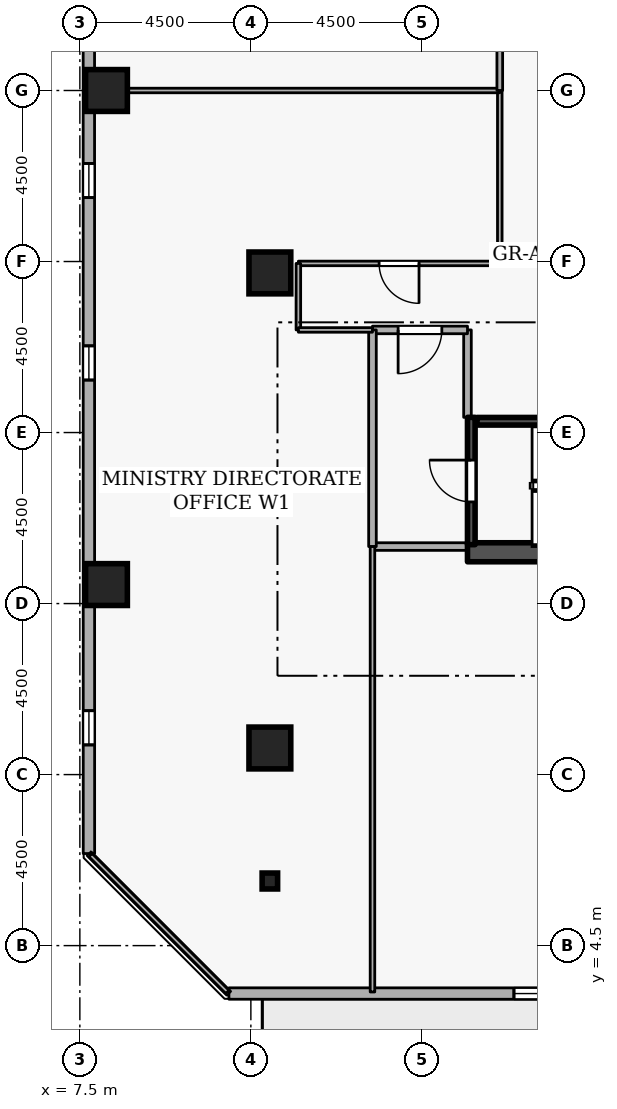
"""IFC4 building model, lengths in metres.
Left out: names, types, materials, properties, quantities, classifications, styles, units other than length and angle.
Written with IfcOpenShell. Run it as: python <this file> out.ifc"""

import sys

from ifc_helpers import new_model, si_unit, direction, frame, frame_2d, origin, origin_2d, place, context, subcontext, project, spatial, rectangle, i_section, extrude, element, fill, save


model = new_model("IFC4")
c1 = context("Model", 3, precision=1e-05, world=origin(), true_north=direction((0.0, 1.0)))
c2 = subcontext(c1, "Body", "Model", "MODEL_VIEW")
j1 = project(units=[si_unit("LENGTHUNIT", "METRE"), si_unit("PLANEANGLEUNIT", "RADIAN")], contexts=[c1])
p1 = place(None, origin())
s1 = spatial("IfcSite", under=j1, at=p1, CompositionType="ELEMENT")
p2 = place(p1, origin())
s2 = spatial("IfcBuilding", under=s1, at=p2, CompositionType="ELEMENT")
p3 = place(p2, frame((0.0, 0.0, 156.3)))
s3 = spatial("IfcBuildingStorey", under=s2, at=p3, CompositionType="ELEMENT", Elevation=156.3)
p4 = place(p3, frame((17.7, 14.85, 0.0), z_axis=(0.0, 0.0, 1.0), x_axis=(1.0, 0.0, 0.0)))
e1 = element("IfcWall", 1, at=p4, inside=s3, PredefinedType="SHEAR", context=c2, shape_type="SweptSolid", body=[
    extrude(rectangle(XDim=15.6, YDim=0.5, at=frame_2d((7.8, 0.0))), origin(), (0.0, 0.0, 1.0), 3.6),
])
for number, where, z_axis, x_axis in (
    (2, (12.5, 9.7, 0.0), (0.0, 0.0, 1.0), (1.0, 0.0, 0.0)),
    (3, (8.2, 14.0, 0.0), (0.0, 0.0, 1.0), (1.0, 0.0, 0.0)),
    (4, (8.2, 27.0, 0.0), (0.0, 0.0, 1.0), (1.0, 0.0, 0.0)),
    (5, (12.5, 22.2, 0.0), (0.0, 0.0, 1.0), (1.0, 0.0, 0.0)),
):
    element("IfcColumn", number, at=place(p3, frame(where, z_axis=z_axis, x_axis=x_axis)), inside=s3, PredefinedType="COLUMN", context=c2, shape_type="SweptSolid", body=[
        extrude(rectangle(XDim=1.1, YDim=1.1, at=origin_2d()), origin(), (0.0, 0.0, 1.0), 3.6),
    ])
p5 = place(p3, frame((12.5, 6.2, 0.0), z_axis=(0.0, 0.0, 1.0), x_axis=(1.0, 0.0, 0.0)))
e6 = element("IfcColumn", 6, at=p5, inside=s3, PredefinedType="COLUMN", context=c2, shape_type="SweptSolid", body=[
    extrude(i_section(OverallWidth=0.407, OverallDepth=0.419, WebThickness=0.031, FlangeThickness=0.049, FilletRadius=0.015, at=origin_2d()), origin(), (0.0, 0.0, 1.0), 3.6),
])
p6 = place(p3, frame((11.422, 3.239, 0.0), z_axis=(0.0, 0.0, 1.0), x_axis=(0.999999994606, -0.000103863011, 0.0)))
e7 = element("IfcWall", 7, at=p6, inside=s3, PredefinedType="STANDARD", context=c2, shape_type="SweptSolid", body=[
    extrude(rectangle(XDim=35.259, YDim=0.3, at=frame_2d((17.629, 0.0))), origin(), (0.0, 0.0, 1.0), 2.7),
])
p7 = place(p6, frame((22.58, 0.0, 0.0)))
e8 = element("IfcOpeningElement", 8, at=p7, cuts=e7, PredefinedType="OPENING", context=c2, shape_type="SweptSolid", body=[
    extrude(rectangle(XDim=1.0, YDim=2.08, at=frame_2d((0.5, 1.04))), frame((0.0, 0.16, 0.0), z_axis=(0.0, -1.0, 0.0), x_axis=(1.0, 0.0, 0.0)), (0.0, 0.0, 1.0), 0.32),
])
p8 = place(p6, frame((7.5, 0.0, 0.72)))
e9 = element("IfcOpeningElement", 9, at=p8, cuts=e7, PredefinedType="OPENING", context=c2, shape_type="SweptSolid", body=[
    extrude(rectangle(XDim=0.9, YDim=1.75, at=frame_2d((0.45, 0.875))), frame((0.0, 0.16, 0.0), z_axis=(0.0, -1.0, 0.0), x_axis=(1.0, 0.0, 0.0)), (0.0, 0.0, 1.0), 0.32),
])
p9 = place(p6, frame((12.3, 0.0, 0.72)))
e10 = element("IfcOpeningElement", 10, at=p9, cuts=e7, PredefinedType="OPENING", context=c2, shape_type="SweptSolid", body=[
    extrude(rectangle(XDim=0.9, YDim=1.75, at=frame_2d((0.45, 0.875))), frame((0.0, 0.16, 0.0), z_axis=(0.0, -1.0, 0.0), x_axis=(1.0, 0.0, 0.0)), (0.0, 0.0, 1.0), 0.32),
])
p10 = place(p6, frame((17.1, 0.0, 0.72)))
e11 = element("IfcOpeningElement", 11, at=p10, cuts=e7, PredefinedType="OPENING", context=c2, shape_type="SweptSolid", body=[
    extrude(rectangle(XDim=0.9, YDim=1.75, at=frame_2d((0.45, 0.875))), frame((0.0, 0.16, 0.0), z_axis=(0.0, -1.0, 0.0), x_axis=(1.0, 0.0, 0.0)), (0.0, 0.0, 1.0), 0.32),
])
p11 = place(p6, frame((26.7, 0.0, 0.72)))
e12 = element("IfcOpeningElement", 12, at=p11, cuts=e7, PredefinedType="OPENING", context=c2, shape_type="SweptSolid", body=[
    extrude(rectangle(XDim=0.9, YDim=1.75, at=frame_2d((0.45, 0.875))), frame((0.0, 0.16, 0.0), z_axis=(0.0, -1.0, 0.0), x_axis=(1.0, 0.0, 0.0)), (0.0, 0.0, 1.0), 0.32),
])
p12 = place(p6, frame((31.5, 0.0, 0.72)))
e13 = element("IfcOpeningElement", 13, at=p12, cuts=e7, PredefinedType="OPENING", context=c2, shape_type="SweptSolid", body=[
    extrude(rectangle(XDim=0.9, YDim=1.75, at=frame_2d((0.45, 0.875))), frame((0.0, 0.16, 0.0), z_axis=(0.0, -1.0, 0.0), x_axis=(1.0, 0.0, 0.0)), (0.0, 0.0, 1.0), 0.32),
])
p13 = place(p3, frame((7.735, 42.181, 0.0), z_axis=(0.0, 0.0, 1.0), x_axis=(0.000103863011, -0.999999994606, 0.0)))
e14 = element("IfcWall", 14, at=p13, inside=s3, PredefinedType="STANDARD", context=c2, shape_type="SweptSolid", body=[
    extrude(rectangle(XDim=35.259, YDim=0.3, at=frame_2d((17.629, 0.0))), origin(), (0.0, 0.0, 1.0), 2.7),
])
p14 = place(p13, frame((7.5, 0.0, 0.72)))
e15 = element("IfcOpeningElement", 15, at=p14, cuts=e14, PredefinedType="OPENING", context=c2, shape_type="SweptSolid", body=[
    extrude(rectangle(XDim=0.9, YDim=1.75, at=frame_2d((0.45, 0.875))), frame((0.0, 0.16, 0.0), z_axis=(0.0, -1.0, 0.0), x_axis=(1.0, 0.0, 0.0)), (0.0, 0.0, 1.0), 0.32),
])
p15 = place(p13, frame((12.3, 0.0, 0.72)))
e16 = element("IfcOpeningElement", 16, at=p15, cuts=e14, PredefinedType="OPENING", context=c2, shape_type="SweptSolid", body=[
    extrude(rectangle(XDim=0.9, YDim=1.75, at=frame_2d((0.45, 0.875))), frame((0.0, 0.16, 0.0), z_axis=(0.0, -1.0, 0.0), x_axis=(1.0, 0.0, 0.0)), (0.0, 0.0, 1.0), 0.32),
])
p16 = place(p13, frame((17.1, 0.0, 0.72)))
e17 = element("IfcOpeningElement", 17, at=p16, cuts=e14, PredefinedType="OPENING", context=c2, shape_type="SweptSolid", body=[
    extrude(rectangle(XDim=0.9, YDim=1.75, at=frame_2d((0.45, 0.875))), frame((0.0, 0.16, 0.0), z_axis=(0.0, -1.0, 0.0), x_axis=(1.0, 0.0, 0.0)), (0.0, 0.0, 1.0), 0.32),
])
p17 = place(p13, frame((21.9, 0.0, 0.72)))
e18 = element("IfcOpeningElement", 18, at=p17, cuts=e14, PredefinedType="OPENING", context=c2, shape_type="SweptSolid", body=[
    extrude(rectangle(XDim=0.9, YDim=1.75, at=frame_2d((0.45, 0.875))), frame((0.0, 0.16, 0.0), z_axis=(0.0, -1.0, 0.0), x_axis=(1.0, 0.0, 0.0)), (0.0, 0.0, 1.0), 0.32),
])
p18 = place(p13, frame((31.5, 0.0, 0.72)))
e19 = element("IfcOpeningElement", 19, at=p18, cuts=e14, PredefinedType="OPENING", context=c2, shape_type="SweptSolid", body=[
    extrude(rectangle(XDim=0.9, YDim=1.75, at=frame_2d((0.45, 0.875))), frame((0.0, 0.16, 0.0), z_axis=(0.0, -1.0, 0.0), x_axis=(1.0, 0.0, 0.0)), (0.0, 0.0, 1.0), 0.32),
])
p19 = place(p3, frame((17.8, 15.05, 0.0), z_axis=(0.0, 0.0, 1.0), x_axis=(0.0, 1.0, 0.0)))
e20 = element("IfcWall", 20, at=p19, inside=s3, PredefinedType="SHEAR", context=c2, shape_type="SweptSolid", body=[
    extrude(rectangle(XDim=3.35, YDim=0.2, at=frame_2d((1.675, 0.0))), origin(), (0.0, 0.0, 1.0), 3.6),
])
p20 = place(p19, frame((1.125, 0.0, 0.0)))
e21 = element("IfcOpeningElement", 21, at=p20, cuts=e20, PredefinedType="OPENING", context=c2, shape_type="SweptSolid", body=[
    extrude(rectangle(XDim=1.1, YDim=2.1, at=frame_2d((0.55, 1.05))), frame((0.0, 0.11, 0.0), z_axis=(0.0, -1.0, 0.0), x_axis=(1.0, 0.0, 0.0)), (0.0, 0.0, 1.0), 0.22),
])
p21 = place(p3, frame((25.05, 18.297, 0.0), z_axis=(0.0, 0.0, 1.0), x_axis=(-1.0, 0.0, 0.0)))
e22 = element("IfcWall", 22, at=p21, inside=s3, PredefinedType="SHEAR", context=c2, shape_type="SweptSolid", body=[
    extrude(rectangle(XDim=7.1, YDim=0.2, at=frame_2d((3.55, 0.0))), origin(), (0.0, 0.0, 1.0), 3.6),
])
p22 = place(p3, frame((15.2, 15.0, 0.0), z_axis=(0.0, 0.0, 1.0), x_axis=(1.0, 0.0, 0.0)))
e23 = element("IfcWall", 23, at=p22, inside=s3, PredefinedType="STANDARD", context=c2, shape_type="SweptSolid", body=[
    extrude(rectangle(XDim=2.5, YDim=0.2, at=frame_2d((1.25, 0.0))), origin(), (0.0, 0.0, 1.0), 3.34),
])
p23 = place(p3, frame((17.7, 18.4, 0.0), z_axis=(0.0, 0.0, 1.0), x_axis=(0.0, 1.0, 0.0)))
e24 = element("IfcWall", 24, at=p23, inside=s3, PredefinedType="STANDARD", context=c2, shape_type="SweptSolid", body=[
    extrude(rectangle(XDim=2.3, YDim=0.2, at=frame_2d((1.15, 0.0))), origin(), (0.0, 0.0, 1.0), 2.545),
])
p24 = place(p3, frame((17.7, 20.7, 0.0), z_axis=(0.0, 0.0, 1.0), x_axis=(-1.0, 0.0, 0.0)))
e25 = element("IfcWall", 25, at=p24, inside=s3, PredefinedType="STANDARD", context=c2, shape_type="SweptSolid", body=[
    extrude(rectangle(XDim=2.5, YDim=0.2, at=frame_2d((1.25, 0.0))), origin(), (0.0, 0.0, 1.0), 3.34),
])
p25 = place(p24, frame((0.675, 0.0, 0.0)))
e26 = element("IfcOpeningElement", 26, at=p25, cuts=e25, PredefinedType="OPENING", context=c2, shape_type="SweptSolid", body=[
    extrude(rectangle(XDim=1.15, YDim=2.1, at=frame_2d((0.575, 1.05))), frame((0.0, 0.11, 0.0), z_axis=(0.0, -1.0, 0.0), x_axis=(1.0, 0.0, 0.0)), (0.0, 0.0, 1.0), 0.22),
])
p26 = place(p3, frame((15.2, 20.7, 0.0), z_axis=(0.0, 0.0, 1.0), x_axis=(0.0, -1.0, 0.0)))
e27 = element("IfcWall", 27, at=p26, inside=s3, PredefinedType="STANDARD", context=c2, shape_type="SweptSolid", body=[
    extrude(rectangle(XDim=5.7, YDim=0.2, at=frame_2d((2.85, 0.0))), origin(), (0.0, 0.0, 1.0), 3.34),
])
p27 = place(p3, frame((18.55, 27.0, 0.0), z_axis=(0.0, 0.0, 1.0), x_axis=(0.0, -1.0, 0.0)))
e28 = element("IfcWall", 28, at=p27, inside=s3, PredefinedType="PARTITIONING", context=c2, shape_type="SweptSolid", body=[
    extrude(rectangle(XDim=4.55, YDim=0.12, at=frame_2d((2.275, 0.0))), origin(), (0.0, 0.0, 1.0), 3.34),
])
p28 = place(p3, frame((18.55, 22.45, 0.0), z_axis=(0.0, 0.0, 1.0), x_axis=(-1.0, 0.0, 0.0)))
e29 = element("IfcWall", 29, at=p28, inside=s3, PredefinedType="PARTITIONING", context=c2, shape_type="SweptSolid", body=[
    extrude(rectangle(XDim=5.3, YDim=0.12, at=frame_2d((2.65, 0.0))), origin(), (0.0, 0.0, 1.0), 3.34),
])
p29 = place(p28, frame((2.125, 0.0, 0.0)))
e30 = element("IfcOpeningElement", 30, at=p29, cuts=e29, PredefinedType="OPENING", context=c2, shape_type="SweptSolid", body=[
    extrude(rectangle(XDim=1.05, YDim=2.1, at=frame_2d((0.525, 1.05))), frame((0.0, 0.07, 0.0), z_axis=(0.0, -1.0, 0.0), x_axis=(1.0, 0.0, 0.0)), (0.0, 0.0, 1.0), 0.14),
])
p30 = place(p3, frame((13.25, 22.45, 0.0), z_axis=(0.0, 0.0, 1.0), x_axis=(0.0, -1.0, 0.0)))
e31 = element("IfcWall", 31, at=p30, inside=s3, PredefinedType="PARTITIONING", context=c2, shape_type="SweptSolid", body=[
    extrude(rectangle(XDim=1.75, YDim=0.12, at=frame_2d((0.875, 0.0))), origin(), (0.0, 0.0, 1.0), 3.34),
])
p31 = place(p3, frame((13.25, 20.7, 0.0), z_axis=(0.0, 0.0, 1.0), x_axis=(1.0, 0.0, 0.0)))
e32 = element("IfcWall", 32, at=p31, inside=s3, PredefinedType="PARTITIONING", context=c2, shape_type="SweptSolid", body=[
    extrude(rectangle(XDim=1.95, YDim=0.12, at=frame_2d((0.975, 0.0))), origin(), (0.0, 0.0, 1.0), 3.34),
])
p32 = place(p3, frame((15.2, 15.0, 0.0), z_axis=(0.0, 0.0, 1.0), x_axis=(0.0, -1.0, 0.0)))
e33 = element("IfcWall", 33, at=p32, inside=s3, PredefinedType="PARTITIONING", context=c2, shape_type="SweptSolid", body=[
    extrude(rectangle(XDim=11.72, YDim=0.12, at=frame_2d((5.86, 0.0))), origin(), (0.0, 0.0, 1.0), 3.34),
])
p33 = place(p3, frame((11.383, 3.28, 0.0), z_axis=(0.0, 0.0, 1.0), x_axis=(-0.707106781187, 0.707106781187, 0.0)))
e34 = element("IfcWall", 34, at=p33, inside=s3, PredefinedType="PARTITIONING", context=c2, shape_type="SweptSolid", body=[
    extrude(rectangle(XDim=5.095, YDim=0.12, at=frame_2d((2.547, 0.0))), origin(), (0.0, 0.0, 1.0), 3.34),
])
p34 = place(p3, frame((7.78, 27.0, 0.0), z_axis=(0.0, 0.0, 1.0), x_axis=(1.0, 0.0, 0.0)))
e35 = element("IfcWall", 35, at=p34, inside=s3, PredefinedType="PARTITIONING", context=c2, shape_type="SweptSolid", body=[
    extrude(rectangle(XDim=10.77, YDim=0.12, at=frame_2d((5.385, 0.0))), origin(), (0.0, 0.0, 1.0), 2.932),
])
p35 = place(p3, frame((18.55, 31.55, 0.0), z_axis=(0.0, 0.0, 1.0), x_axis=(0.0, -1.0, 0.0)))
e36 = element("IfcWall", 36, at=p35, inside=s3, PredefinedType="PARTITIONING", context=c2, shape_type="SweptSolid", body=[
    extrude(rectangle(XDim=4.55, YDim=0.15, at=frame_2d((2.275, 0.0))), origin(), (0.0, 0.0, 1.0), 3.34),
])
p36 = place(p8, origin())
e37 = element("IfcWindow", 37, at=p36, inside=s3, PartitioningType="SINGLE_PANEL", PredefinedType="WINDOW", context=c2, shape_type="SweptSolid", body=[
    extrude(rectangle(XDim=0.9, YDim=1.75, at=frame_2d((0.45, 0.875))), frame((0.0, 0.03, 0.0), z_axis=(0.0, -1.0, 0.0), x_axis=(1.0, 0.0, 0.0)), (0.0, 0.0, 1.0), 0.06),
])
fill(e9, e37)
p37 = place(p16, origin())
e38 = element("IfcWindow", 38, at=p37, inside=s3, PartitioningType="SINGLE_PANEL", PredefinedType="WINDOW", context=c2, shape_type="SweptSolid", body=[
    extrude(rectangle(XDim=0.9, YDim=1.75, at=frame_2d((0.45, 0.875))), frame((0.0, 0.03, 0.0), z_axis=(0.0, -1.0, 0.0), x_axis=(1.0, 0.0, 0.0)), (0.0, 0.0, 1.0), 0.06),
])
fill(e17, e38)
p38 = place(p17, origin())
e39 = element("IfcWindow", 39, at=p38, inside=s3, PartitioningType="SINGLE_PANEL", PredefinedType="WINDOW", context=c2, shape_type="SweptSolid", body=[
    extrude(rectangle(XDim=0.9, YDim=1.75, at=frame_2d((0.45, 0.875))), frame((0.0, 0.03, 0.0), z_axis=(0.0, -1.0, 0.0), x_axis=(1.0, 0.0, 0.0)), (0.0, 0.0, 1.0), 0.06),
])
fill(e18, e39)
p39 = place(p18, origin())
e40 = element("IfcWindow", 40, at=p39, inside=s3, PartitioningType="SINGLE_PANEL", PredefinedType="WINDOW", context=c2, shape_type="SweptSolid", body=[
    extrude(rectangle(XDim=0.9, YDim=1.75, at=frame_2d((0.45, 0.875))), frame((0.0, 0.03, 0.0), z_axis=(0.0, -1.0, 0.0), x_axis=(1.0, 0.0, 0.0)), (0.0, 0.0, 1.0), 0.06),
])
fill(e19, e40)
p40 = place(p20, origin())
e41 = element("IfcDoor", 41, at=p40, inside=s3, OperationType="SINGLE_SWING_RIGHT", PredefinedType="DOOR", context=c2, shape_type="SweptSolid", body=[
    extrude(rectangle(XDim=1.1, YDim=2.1, at=frame_2d((0.55, 1.05))), frame((0.0, 0.025, 0.0), z_axis=(0.0, -1.0, 0.0), x_axis=(1.0, 0.0, 0.0)), (0.0, 0.0, 1.0), 0.05),
])
fill(e21, e41)
p41 = place(p25, origin())
e42 = element("IfcDoor", 42, at=p41, inside=s3, OperationType="SINGLE_SWING_RIGHT", PredefinedType="DOOR", context=c2, shape_type="SweptSolid", body=[
    extrude(rectangle(XDim=1.15, YDim=2.1, at=frame_2d((0.575, 1.05))), frame((0.0, 0.025, 0.0), z_axis=(0.0, -1.0, 0.0), x_axis=(1.0, 0.0, 0.0)), (0.0, 0.0, 1.0), 0.05),
])
fill(e26, e42)
p42 = place(p29, origin())
e43 = element("IfcDoor", 43, at=p42, inside=s3, OperationType="SINGLE_SWING_LEFT", PredefinedType="DOOR", context=c2, shape_type="SweptSolid", body=[
    extrude(rectangle(XDim=1.05, YDim=2.1, at=frame_2d((0.525, 1.05))), frame((0.0, 0.025, 0.0), z_axis=(0.0, -1.0, 0.0), x_axis=(1.0, 0.0, 0.0)), (0.0, 0.0, 1.0), 0.05),
])
fill(e30, e43)
save(model, sys.argv[1])
